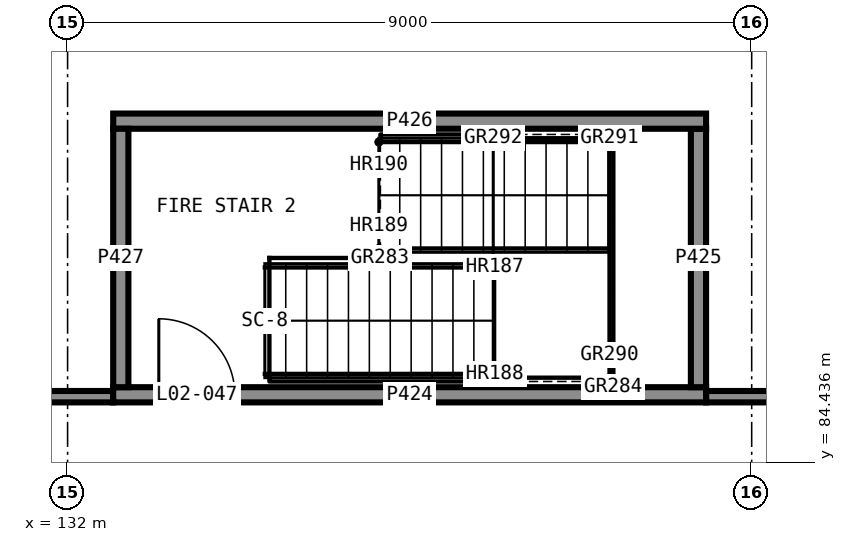
"""IFC4 building model, lengths in metres.
Left out: names, types, materials, properties, quantities, classifications, styles, units other than length and angle.
Written with IfcOpenShell. Run it as: python <this file> out.ifc"""

import sys

from ifc_helpers import new_model, si_unit, direction, frame, frame_2d, origin, place, context, subcontext, project, spatial, rectangle, extrude, element, fill, save


model = new_model("IFC4")
c1 = context("Model", 3, precision=1e-05, world=origin(), true_north=direction((0.0, 1.0)))
c2 = subcontext(c1, "Body", "Model", "MODEL_VIEW")
j1 = project(units=[si_unit("LENGTHUNIT", "METRE"), si_unit("PLANEANGLEUNIT", "RADIAN")], contexts=[c1])
p1 = place(None, origin())
s1 = spatial("IfcSite", under=j1, at=p1, CompositionType="ELEMENT")
p2 = place(p1, origin())
s2 = spatial("IfcBuilding", under=s1, at=p2, CompositionType="ELEMENT")
p3 = place(p2, frame((0.0, 0.0, 9.5)))
s3 = spatial("IfcBuildingStorey", under=s2, at=p3, CompositionType="ELEMENT", Elevation=9.5)
p4 = place(p3, frame((132.6, 85.325, 0.0), z_axis=(0.0, 0.0, 1.0), x_axis=(1.0, 0.0, 0.0)))
e1 = element("IfcWall", 1, at=p4, inside=s3, PredefinedType="SHEAR", context=c2, shape_type="SweptSolid", body=[
    extrude(rectangle(XDim=7.8, YDim=0.2, at=frame_2d((3.9, 0.0))), origin(), (0.0, 0.0, 1.0), 3.75),
])
p5 = place(p4, frame((0.6, 0.0, 0.0)))
e2 = element("IfcOpeningElement", 2, at=p5, cuts=e1, PredefinedType="OPENING", context=c2, shape_type="SweptSolid", body=[
    extrude(rectangle(XDim=1.0, YDim=2.1, at=frame_2d((0.5, 1.05))), frame((0.0, 0.11, 0.0), z_axis=(0.0, -1.0, 0.0), x_axis=(1.0, 0.0, 0.0)), (0.0, 0.0, 1.0), 0.22),
])
p6 = place(p3, frame((140.3, 85.425, 0.0), z_axis=(0.0, 0.0, 1.0), x_axis=(0.0, 1.0, 0.0)))
e3 = element("IfcWall", 3, at=p6, inside=s3, PredefinedType="SHEAR", context=c2, shape_type="SweptSolid", body=[
    extrude(rectangle(XDim=3.4, YDim=0.2, at=frame_2d((1.7, 0.0))), origin(), (0.0, 0.0, 1.0), 3.75),
])
p7 = place(p3, frame((140.4, 88.925, 0.0), z_axis=(0.0, 0.0, 1.0), x_axis=(-1.0, 0.0, 0.0)))
e4 = element("IfcWall", 4, at=p7, inside=s3, PredefinedType="SHEAR", context=c2, shape_type="SweptSolid", body=[
    extrude(rectangle(XDim=7.8, YDim=0.2, at=frame_2d((3.9, 0.0))), origin(), (0.0, 0.0, 1.0), 3.75),
])
p8 = place(p3, frame((132.7, 88.825, 0.0), z_axis=(0.0, 0.0, 1.0), x_axis=(0.0, -1.0, 0.0)))
e5 = element("IfcWall", 5, at=p8, inside=s3, PredefinedType="SHEAR", context=c2, shape_type="SweptSolid", body=[
    extrude(rectangle(XDim=3.4, YDim=0.2, at=frame_2d((1.7, 0.0))), origin(), (0.0, 0.0, 1.0), 3.75),
])
p9 = place(p3, frame((122.7, 85.3, 0.0), z_axis=(0.0, 0.0, 1.0), x_axis=(1.0, 0.0, 0.0)))
e6 = element("IfcWall", 6, at=p9, inside=s3, PredefinedType="PARTITIONING", context=c2, shape_type="SweptSolid", body=[
    extrude(rectangle(XDim=9.9, YDim=0.15, at=frame_2d((4.95, 0.0))), origin(), (0.0, 0.0, 1.0), 3.75),
])
p10 = place(p3, frame((140.4, 85.3, 0.0), z_axis=(0.0, 0.0, 1.0), x_axis=(1.0, 0.0, 0.0)))
e7 = element("IfcWall", 7, at=p10, inside=s3, PredefinedType="PARTITIONING", context=c2, shape_type="SweptSolid", body=[
    extrude(rectangle(XDim=2.825, YDim=0.15, at=frame_2d((1.413, 0.0))), origin(), (0.0, 0.0, 1.0), 3.75),
])
p11 = place(p5, origin())
e8 = element("IfcDoor", 8, at=p11, inside=s3, OperationType="SINGLE_SWING_RIGHT", PredefinedType="DOOR", context=c2, shape_type="SweptSolid", body=[
    extrude(rectangle(XDim=1.0, YDim=2.1, at=frame_2d((0.5, 1.05))), frame((0.0, 0.025, 0.0), z_axis=(0.0, -1.0, 0.0), x_axis=(1.0, 0.0, 0.0)), (0.0, 0.0, 1.0), 0.05),
])
fill(e2, e8)
save(model, sys.argv[1])
